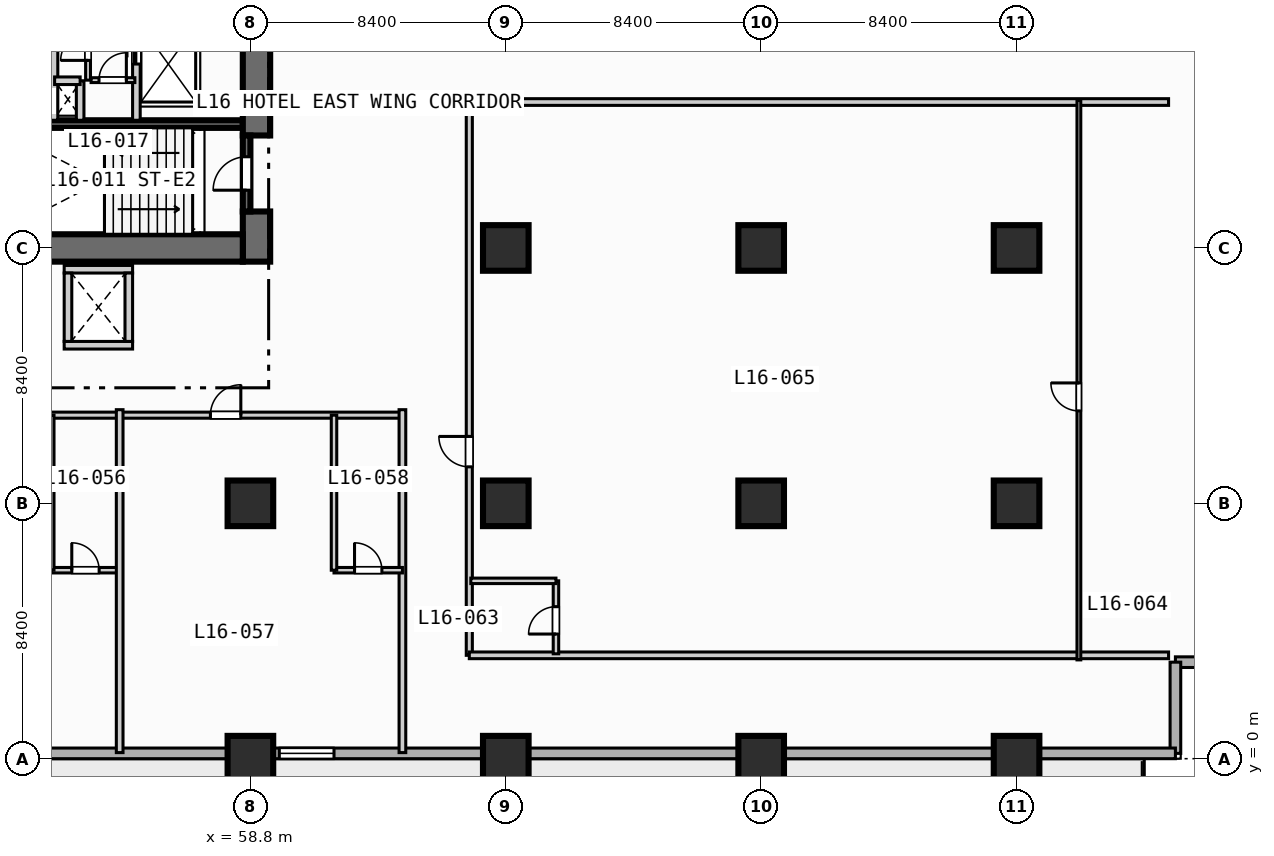
"""IFC4 building model, lengths in metres.
Left out: names, types, materials, properties, quantities, classifications, styles, units other than length and angle.
Written with IfcOpenShell. Run it as: python <this file> out.ifc"""

import sys

from ifc_helpers import new_model, si_unit, direction, frame, frame_2d, origin, origin_2d, place, context, subcontext, project, spatial, rectangle, extrude, element, fill, save


model = new_model("IFC4")
c1 = context("Model", 3, precision=1e-05, world=origin(), true_north=direction((0.0, 1.0)))
c2 = subcontext(c1, "Body", "Model", "MODEL_VIEW")
j1 = project(units=[si_unit("LENGTHUNIT", "METRE"), si_unit("PLANEANGLEUNIT", "RADIAN")], contexts=[c1])
p1 = place(None, origin())
s1 = spatial("IfcSite", under=j1, at=p1, CompositionType="ELEMENT")
p2 = place(p1, origin())
s2 = spatial("IfcBuilding", under=s1, at=p2, CompositionType="ELEMENT")
p3 = place(p2, frame((0.0, 0.0, 70.0)))
s3 = spatial("IfcBuildingStorey", under=s2, at=p3, CompositionType="ELEMENT", Elevation=70.0)
p4 = place(p3, frame((50.5, 20.875, 0.0), z_axis=(0.0, 0.0, 1.0), x_axis=(1.0, 0.0, 0.0)))
e1 = element("IfcWall", 1, at=p4, inside=s3, PredefinedType="SOLIDWALL", context=c2, shape_type="SweptSolid", body=[
    extrude(rectangle(XDim=8.05, YDim=0.25, at=frame_2d((4.025, 0.0))), origin(), (0.0, 0.0, 1.0), 3.55),
])
p5 = place(p3, frame((59.0, 16.35, 0.0), z_axis=(0.0, 0.0, 1.0), x_axis=(0.0, 1.0, 0.0)))
e2 = element("IfcWall", 2, at=p5, inside=s3, PredefinedType="SHEAR", context=c2, shape_type="SweptSolid", body=[
    extrude(rectangle(XDim=1.65, YDim=0.9, at=frame_2d((0.825, 0.0))), origin(), (0.0, 0.0, 1.0), 3.55),
])
p6 = place(p3, frame((59.0, 20.5, 0.0), z_axis=(0.0, 0.0, 1.0), x_axis=(0.0, 1.0, 0.0)))
e3 = element("IfcWall", 3, at=p6, inside=s3, PredefinedType="SHEAR", context=c2, shape_type="SweptSolid", body=[
    extrude(rectangle(XDim=5.15, YDim=0.9, at=frame_2d((2.575, 0.0))), origin(), (0.0, 0.0, 1.0), 3.55),
])
p7 = place(p3, frame((42.2, 16.8, 0.0), z_axis=(0.0, 0.0, 1.0), x_axis=(1.0, 0.0, 0.0)))
e4 = element("IfcWall", 4, at=p7, inside=s3, PredefinedType="SHEAR", context=c2, shape_type="SweptSolid", body=[
    extrude(rectangle(XDim=16.35, YDim=0.9, at=frame_2d((8.175, 0.0))), origin(), (0.0, 0.0, 1.0), 3.55),
])
for number, where, z_axis, x_axis in (
    (5, (58.8, 0.0, 0.0), (0.0, 0.0, 1.0), (1.0, 0.0, 0.0)),
    (6, (58.8, 8.4, 0.0), (0.0, 0.0, 1.0), (1.0, 0.0, 0.0)),
    (7, (67.2, 0.0, 0.0), (0.0, 0.0, 1.0), (1.0, 0.0, 0.0)),
    (8, (67.2, 8.4, 0.0), (0.0, 0.0, 1.0), (1.0, 0.0, 0.0)),
    (9, (67.2, 16.8, 0.0), (0.0, 0.0, 1.0), (1.0, 0.0, 0.0)),
    (10, (75.6, 0.0, 0.0), (0.0, 0.0, 1.0), (1.0, 0.0, 0.0)),
    (11, (75.6, 8.4, 0.0), (0.0, 0.0, 1.0), (1.0, 0.0, 0.0)),
    (12, (75.6, 16.8, 0.0), (0.0, 0.0, 1.0), (1.0, 0.0, 0.0)),
    (13, (84.0, 0.0, 0.0), (0.0, 0.0, 1.0), (1.0, 0.0, 0.0)),
    (14, (84.0, 8.4, 0.0), (0.0, 0.0, 1.0), (1.0, 0.0, 0.0)),
    (15, (84.0, 16.8, 0.0), (0.0, 0.0, 1.0), (1.0, 0.0, 0.0)),
):
    element("IfcColumn", number, at=place(p3, frame(where, z_axis=z_axis, x_axis=x_axis)), inside=s3, PredefinedType="COLUMN", context=c2, shape_type="SweptSolid", body=[
        extrude(rectangle(XDim=1.5, YDim=1.5, at=origin_2d()), origin(), (0.0, 0.0, 1.0), 3.8),
    ])
for number, where, z_axis, x_axis in (
    (16, (92.225, 3.175, 0.0), (0.0, 0.0, 1.0), (-1.0, 0.0, 0.0)),
    (17, (89.225, 3.175, 0.0), (0.0, 0.0, 1.0), (0.0, -1.0, 0.0)),
):
    element("IfcWall", number, at=place(p3, frame(where, z_axis=z_axis, x_axis=x_axis)), inside=s3, PredefinedType="STANDARD", context=c2, shape_type="SweptSolid", body=[
        extrude(rectangle(XDim=3.0, YDim=0.35, at=frame_2d((1.5, 0.0))), origin(), (0.0, 0.0, 1.0), 3.55),
    ])
p8 = place(p3, frame((89.225, 0.175, 0.0), z_axis=(0.0, 0.0, 1.0), x_axis=(-1.0, 0.0, 0.0)))
e18 = element("IfcWall", 18, at=p8, inside=s3, PredefinedType="STANDARD", context=c2, shape_type="SweptSolid", body=[
    extrude(rectangle(XDim=86.05, YDim=0.35, at=frame_2d((43.025, 0.0))), origin(), (0.0, 0.0, 1.0), 3.55),
])
p9 = place(p8, frame((67.525, 0.0, 0.0)))
e19 = element("IfcOpeningElement", 19, at=p9, cuts=e18, PredefinedType="OPENING", context=c2, shape_type="SweptSolid", body=[
    extrude(rectangle(XDim=1.4, YDim=2.2, at=frame_2d((0.7, 1.1))), frame((0.0, 0.185, 0.0), z_axis=(0.0, -1.0, 0.0), x_axis=(1.0, 0.0, 0.0)), (0.0, 0.0, 1.0), 0.37),
])
p10 = place(p8, frame((58.725, 0.0, 0.85)))
e20 = element("IfcOpeningElement", 20, at=p10, cuts=e18, PredefinedType="OPENING", context=c2, shape_type="SweptSolid", body=[
    extrude(rectangle(XDim=2.2, YDim=1.8, at=frame_2d((1.1, 0.9))), frame((0.0, 0.185, 0.0), z_axis=(0.0, -1.0, 0.0), x_axis=(1.0, 0.0, 0.0)), (0.0, 0.0, 1.0), 0.37),
])
p11 = place(p8, frame((50.325, 0.0, 0.85)))
e21 = element("IfcOpeningElement", 21, at=p11, cuts=e18, PredefinedType="OPENING", context=c2, shape_type="SweptSolid", body=[
    extrude(rectangle(XDim=2.2, YDim=1.8, at=frame_2d((1.1, 0.9))), frame((0.0, 0.185, 0.0), z_axis=(0.0, -1.0, 0.0), x_axis=(1.0, 0.0, 0.0)), (0.0, 0.0, 1.0), 0.37),
])
p12 = place(p8, frame((41.925, 0.0, 0.85)))
e22 = element("IfcOpeningElement", 22, at=p12, cuts=e18, PredefinedType="OPENING", context=c2, shape_type="SweptSolid", body=[
    extrude(rectangle(XDim=2.2, YDim=1.8, at=frame_2d((1.1, 0.9))), frame((0.0, 0.185, 0.0), z_axis=(0.0, -1.0, 0.0), x_axis=(1.0, 0.0, 0.0)), (0.0, 0.0, 1.0), 0.37),
])
p13 = place(p8, frame((27.675, 0.0, 0.85)))
e23 = element("IfcOpeningElement", 23, at=p13, cuts=e18, PredefinedType="OPENING", context=c2, shape_type="SweptSolid", body=[
    extrude(rectangle(XDim=1.8, YDim=1.8, at=frame_2d((0.9, 0.9))), frame((0.0, 0.185, 0.0), z_axis=(0.0, -1.0, 0.0), x_axis=(1.0, 0.0, 0.0)), (0.0, 0.0, 1.0), 0.37),
])
p14 = place(p3, frame((58.675, 18.0, 0.0), z_axis=(0.0, 0.0, 1.0), x_axis=(0.0, 1.0, 0.0)))
e24 = element("IfcWall", 24, at=p14, inside=s3, PredefinedType="SOLIDWALL", context=c2, shape_type="SweptSolid", body=[
    extrude(rectangle(XDim=2.5, YDim=0.25, at=frame_2d((1.25, 0.0))), origin(), (0.0, 0.0, 1.0), 3.55),
])
p15 = place(p14, frame((0.7, 0.0, 0.0)))
e25 = element("IfcOpeningElement", 25, at=p15, cuts=e24, PredefinedType="OPENING", context=c2, shape_type="SweptSolid", body=[
    extrude(rectangle(XDim=1.1, YDim=2.15, at=frame_2d((0.55, 1.075))), frame((0.0, 0.135, 0.0), z_axis=(0.0, -1.0, 0.0), x_axis=(1.0, 0.0, 0.0)), (0.0, 0.0, 1.0), 0.27),
])
p16 = place(p3, frame((52.34, 21.0, 0.0), z_axis=(0.0, 0.0, 1.0), x_axis=(0.0, 1.0, 0.0)))
e26 = element("IfcWall", 26, at=p16, inside=s3, PredefinedType="SOLIDWALL", context=c2, shape_type="SweptSolid", body=[
    extrude(rectangle(XDim=3.75, YDim=0.25, at=frame_2d((1.875, 0.0))), origin(), (0.0, 0.0, 1.0), 3.55),
])
p17 = place(p3, frame((55.05, 21.0, 0.0), z_axis=(0.0, 0.0, 1.0), x_axis=(0.0, 1.0, 0.0)))
e27 = element("IfcWall", 27, at=p17, inside=s3, PredefinedType="SOLIDWALL", context=c2, shape_type="SweptSolid", body=[
    extrude(rectangle(XDim=4.15, YDim=0.25, at=frame_2d((2.075, 0.0))), origin(), (0.0, 0.0, 1.0), 3.55),
])
p18 = place(p17, frame((1.85, 0.0, 0.0)))
e28 = element("IfcOpeningElement", 28, at=p18, cuts=e27, PredefinedType="OPENING", context=c2, shape_type="SweptSolid", body=[
    extrude(rectangle(XDim=1.1, YDim=2.15, at=frame_2d((0.55, 1.075))), frame((0.0, 0.135, 0.0), z_axis=(0.0, -1.0, 0.0), x_axis=(1.0, 0.0, 0.0)), (0.0, 0.0, 1.0), 0.27),
])
p19 = place(p3, frame((53.2, 21.0, 0.0), z_axis=(0.0, 0.0, 1.0), x_axis=(0.0, 1.0, 0.0)))
e29 = element("IfcWall", 29, at=p19, inside=s3, PredefinedType="SOLIDWALL", context=c2, shape_type="SweptSolid", body=[
    extrude(rectangle(XDim=1.3, YDim=0.25, at=frame_2d((0.65, 0.0))), origin(), (0.0, 0.0, 1.0), 3.55),
])
p20 = place(p3, frame((52.36, 22.3, 0.0), z_axis=(0.0, 0.0, 1.0), x_axis=(1.0, 0.0, 0.0)))
e30 = element("IfcWall", 30, at=p20, inside=s3, PredefinedType="SOLIDWALL", context=c2, shape_type="SweptSolid", body=[
    extrude(rectangle(XDim=0.84, YDim=0.25, at=frame_2d((0.42, 0.0))), origin(), (0.0, 0.0, 1.0), 3.55),
])
p21 = place(p3, frame((53.56, 22.32, 0.0), z_axis=(0.0, 0.0, 1.0), x_axis=(1.0, 0.0, 0.0)))
e31 = element("IfcWall", 31, at=p21, inside=s3, PredefinedType="PARTITIONING", context=c2, shape_type="SweptSolid", body=[
    extrude(rectangle(XDim=1.44, YDim=0.16, at=frame_2d((0.72, 0.0))), origin(), (0.0, 0.0, 1.0), 3.55),
])
p22 = place(p21, frame((0.26, 0.0, 0.0)))
e32 = element("IfcOpeningElement", 32, at=p22, cuts=e31, PredefinedType="OPENING", context=c2, shape_type="SweptSolid", body=[
    extrude(rectangle(XDim=0.9, YDim=2.1, at=frame_2d((0.45, 1.05))), frame((0.0, 0.09, 0.0), z_axis=(0.0, -1.0, 0.0), x_axis=(1.0, 0.0, 0.0)), (0.0, 0.0, 1.0), 0.18),
])
p23 = place(p3, frame((53.46, 22.32, 0.0), z_axis=(0.0, 0.0, 1.0), x_axis=(0.0, 1.0, 0.0)))
e33 = element("IfcWall", 33, at=p23, inside=s3, PredefinedType="PARTITIONING", context=c2, shape_type="SweptSolid", body=[
    extrude(rectangle(XDim=2.4, YDim=0.16, at=frame_2d((1.2, 0.0))), origin(), (0.0, 0.0, 1.0), 3.55),
])
p24 = place(p23, frame((0.65, 0.0, 0.0)))
e34 = element("IfcOpeningElement", 34, at=p24, cuts=e33, PredefinedType="OPENING", context=c2, shape_type="SweptSolid", body=[
    extrude(rectangle(XDim=0.9, YDim=2.1, at=frame_2d((0.45, 1.05))), frame((0.0, 0.09, 0.0), z_axis=(0.0, -1.0, 0.0), x_axis=(1.0, 0.0, 0.0)), (0.0, 0.0, 1.0), 0.18),
])
for number, where, z_axis, x_axis in (
    (35, (52.675, 13.6, 0.0), (0.0, 0.0, 1.0), (1.0, 0.0, 0.0)),
    (36, (52.675, 16.1, 0.0), (0.0, 0.0, 1.0), (1.0, 0.0, 0.0)),
    (37, (52.8, 13.725, 0.0), (0.0, 0.0, 1.0), (0.0, 1.0, 0.0)),
    (38, (54.8, 13.725, 0.0), (0.0, 0.0, 1.0), (0.0, 1.0, 0.0)),
):
    element("IfcWall", number, at=place(p3, frame(where, z_axis=z_axis, x_axis=x_axis)), inside=s3, PredefinedType="SOLIDWALL", context=c2, shape_type="SweptSolid", body=[
        extrude(rectangle(XDim=2.25, YDim=0.25, at=frame_2d((1.125, 0.0))), origin(), (0.0, 0.0, 1.0), 3.55),
    ])
p25 = place(p3, frame((13.7, 11.3, 0.0), z_axis=(0.0, 0.0, 1.0), x_axis=(1.0, 0.0, 0.0)))
e39 = element("IfcWall", 39, at=p25, inside=s3, PredefinedType="PARTITIONING", context=c2, shape_type="SweptSolid", body=[
    extrude(rectangle(XDim=50.1, YDim=0.2, at=frame_2d((25.05, 0.0))), origin(), (0.0, 0.0, 1.0), 3.55),
])
p26 = place(p25, frame((3.61, 0.0, 0.0)))
e40 = element("IfcOpeningElement", 40, at=p26, cuts=e39, PredefinedType="OPENING", context=c2, shape_type="SweptSolid", body=[
    extrude(rectangle(XDim=1.0, YDim=2.15, at=frame_2d((0.5, 1.075))), frame((0.0, 0.11, 0.0), z_axis=(0.0, -1.0, 0.0), x_axis=(1.0, 0.0, 0.0)), (0.0, 0.0, 1.0), 0.22),
])
p27 = place(p25, frame((16.81, 0.0, 0.0)))
e41 = element("IfcOpeningElement", 41, at=p27, cuts=e39, PredefinedType="OPENING", context=c2, shape_type="SweptSolid", body=[
    extrude(rectangle(XDim=1.0, YDim=2.15, at=frame_2d((0.5, 1.075))), frame((0.0, 0.11, 0.0), z_axis=(0.0, -1.0, 0.0), x_axis=(1.0, 0.0, 0.0)), (0.0, 0.0, 1.0), 0.22),
])
p28 = place(p25, frame((31.935, 0.0, 0.0)))
e42 = element("IfcOpeningElement", 42, at=p28, cuts=e39, PredefinedType="OPENING", context=c2, shape_type="SweptSolid", body=[
    extrude(rectangle(XDim=1.0, YDim=2.15, at=frame_2d((0.5, 1.075))), frame((0.0, 0.11, 0.0), z_axis=(0.0, -1.0, 0.0), x_axis=(1.0, 0.0, 0.0)), (0.0, 0.0, 1.0), 0.22),
])
p29 = place(p25, frame((43.785, 0.0, 0.0)))
e43 = element("IfcOpeningElement", 43, at=p29, cuts=e39, PredefinedType="OPENING", context=c2, shape_type="SweptSolid", body=[
    extrude(rectangle(XDim=1.0, YDim=2.15, at=frame_2d((0.5, 1.075))), frame((0.0, 0.11, 0.0), z_axis=(0.0, -1.0, 0.0), x_axis=(1.0, 0.0, 0.0)), (0.0, 0.0, 1.0), 0.22),
])
p30 = place(p3, frame((52.25, 6.2, 0.0), z_axis=(0.0, 0.0, 1.0), x_axis=(1.0, 0.0, 0.0)))
e44 = element("IfcWall", 44, at=p30, inside=s3, PredefinedType="PLUMBINGWALL", context=c2, shape_type="SweptSolid", body=[
    extrude(rectangle(XDim=2.25, YDim=0.18, at=frame_2d((1.125, 0.0))), origin(), (0.0, 0.0, 1.0), 3.55),
])
p31 = place(p30, frame((0.675, 0.0, 0.0)))
e45 = element("IfcOpeningElement", 45, at=p31, cuts=e44, PredefinedType="OPENING", context=c2, shape_type="SweptSolid", body=[
    extrude(rectangle(XDim=0.9, YDim=2.1, at=frame_2d((0.45, 1.05))), frame((0.0, 0.1, 0.0), z_axis=(0.0, -1.0, 0.0), x_axis=(1.0, 0.0, 0.0)), (0.0, 0.0, 1.0), 0.2),
])
p32 = place(p3, frame((52.25, 6.2, 0.0), z_axis=(0.0, 0.0, 1.0), x_axis=(0.0, 1.0, 0.0)))
e46 = element("IfcWall", 46, at=p32, inside=s3, PredefinedType="PLUMBINGWALL", context=c2, shape_type="SweptSolid", body=[
    extrude(rectangle(XDim=5.1, YDim=0.18, at=frame_2d((2.55, 0.0))), origin(), (0.0, 0.0, 1.0), 3.55),
])
for number, where, z_axis, x_axis in (
    (47, (54.5, 0.2, 0.0), (0.0, 0.0, 1.0), (0.0, 1.0, 0.0)),
    (48, (63.8, 0.2, 0.0), (0.0, 0.0, 1.0), (0.0, 1.0, 0.0)),
):
    element("IfcWall", number, at=place(p3, frame(where, z_axis=z_axis, x_axis=x_axis)), inside=s3, PredefinedType="PARTITIONING", context=c2, shape_type="SweptSolid", body=[
        extrude(rectangle(XDim=11.28, YDim=0.22, at=frame_2d((5.64, 0.0))), origin(), (0.0, 0.0, 1.0), 3.55),
    ])
p33 = place(p3, frame((61.55, 6.2, 0.0), z_axis=(0.0, 0.0, 1.0), x_axis=(1.0, 0.0, 0.0)))
e49 = element("IfcWall", 49, at=p33, inside=s3, PredefinedType="PLUMBINGWALL", context=c2, shape_type="SweptSolid", body=[
    extrude(rectangle(XDim=2.25, YDim=0.18, at=frame_2d((1.125, 0.0))), origin(), (0.0, 0.0, 1.0), 3.55),
])
p34 = place(p33, frame((0.675, 0.0, 0.0)))
e50 = element("IfcOpeningElement", 50, at=p34, cuts=e49, PredefinedType="OPENING", context=c2, shape_type="SweptSolid", body=[
    extrude(rectangle(XDim=0.9, YDim=2.1, at=frame_2d((0.45, 1.05))), frame((0.0, 0.1, 0.0), z_axis=(0.0, -1.0, 0.0), x_axis=(1.0, 0.0, 0.0)), (0.0, 0.0, 1.0), 0.2),
])
p35 = place(p3, frame((61.55, 6.2, 0.0), z_axis=(0.0, 0.0, 1.0), x_axis=(0.0, 1.0, 0.0)))
e51 = element("IfcWall", 51, at=p35, inside=s3, PredefinedType="PLUMBINGWALL", context=c2, shape_type="SweptSolid", body=[
    extrude(rectangle(XDim=5.1, YDim=0.18, at=frame_2d((2.55, 0.0))), origin(), (0.0, 0.0, 1.0), 3.55),
])
p36 = place(p3, frame((66.0, 3.4, 0.0), z_axis=(0.0, 0.0, 1.0), x_axis=(0.0, 1.0, 0.0)))
e52 = element("IfcWall", 52, at=p36, inside=s3, PredefinedType="PARTITIONING", context=c2, shape_type="SweptSolid", body=[
    extrude(rectangle(XDim=18.2, YDim=0.2, at=frame_2d((9.1, 0.0))), origin(), (0.0, 0.0, 1.0), 3.55),
])
p37 = place(p36, frame((6.2, 0.0, 0.0)))
e53 = element("IfcOpeningElement", 53, at=p37, cuts=e52, PredefinedType="OPENING", context=c2, shape_type="SweptSolid", body=[
    extrude(rectangle(XDim=1.0, YDim=2.15, at=frame_2d((0.5, 1.075))), frame((0.0, 0.11, 0.0), z_axis=(0.0, -1.0, 0.0), x_axis=(1.0, 0.0, 0.0)), (0.0, 0.0, 1.0), 0.22),
])
for number, where, z_axis, x_axis in (
    (54, (66.0, 3.4, 0.0), (0.0, 0.0, 1.0), (1.0, 0.0, 0.0)),
    (55, (66.0, 21.6, 0.0), (0.0, 0.0, 1.0), (1.0, 0.0, 0.0)),
):
    element("IfcWall", number, at=place(p3, frame(where, z_axis=z_axis, x_axis=x_axis)), inside=s3, PredefinedType="PARTITIONING", context=c2, shape_type="SweptSolid", body=[
        extrude(rectangle(XDim=23.0, YDim=0.22, at=frame_2d((11.5, 0.0))), origin(), (0.0, 0.0, 1.0), 3.55),
    ])
p38 = place(p3, frame((68.85, 3.45, 0.0), z_axis=(0.0, 0.0, 1.0), x_axis=(0.0, 1.0, 0.0)))
e56 = element("IfcWall", 56, at=p38, inside=s3, PredefinedType="PLUMBINGWALL", context=c2, shape_type="SweptSolid", body=[
    extrude(rectangle(XDim=2.4, YDim=0.18, at=frame_2d((1.2, 0.0))), origin(), (0.0, 0.0, 1.0), 3.55),
])
p39 = place(p38, frame((0.65, 0.0, 0.0)))
e57 = element("IfcOpeningElement", 57, at=p39, cuts=e56, PredefinedType="OPENING", context=c2, shape_type="SweptSolid", body=[
    extrude(rectangle(XDim=0.9, YDim=2.1, at=frame_2d((0.45, 1.05))), frame((0.0, 0.1, 0.0), z_axis=(0.0, -1.0, 0.0), x_axis=(1.0, 0.0, 0.0)), (0.0, 0.0, 1.0), 0.2),
])
p40 = place(p3, frame((66.05, 5.85, 0.0), z_axis=(0.0, 0.0, 1.0), x_axis=(1.0, 0.0, 0.0)))
e58 = element("IfcWall", 58, at=p40, inside=s3, PredefinedType="PLUMBINGWALL", context=c2, shape_type="SweptSolid", body=[
    extrude(rectangle(XDim=2.8, YDim=0.18, at=frame_2d((1.4, 0.0))), origin(), (0.0, 0.0, 1.0), 3.55),
])
p41 = place(p3, frame((86.05, 3.25, 0.0), z_axis=(0.0, 0.0, 1.0), x_axis=(0.0, 1.0, 0.0)))
e59 = element("IfcWall", 59, at=p41, inside=s3, PredefinedType="PARTITIONING", context=c2, shape_type="SweptSolid", body=[
    extrude(rectangle(XDim=18.4, YDim=0.125, at=frame_2d((9.2, 0.0))), origin(), (0.0, 0.0, 1.0), 3.55),
])
p42 = place(p41, frame((8.19, 0.0, 0.0)))
e60 = element("IfcOpeningElement", 60, at=p42, cuts=e59, PredefinedType="OPENING", context=c2, shape_type="SweptSolid", body=[
    extrude(rectangle(XDim=0.92, YDim=2.1, at=frame_2d((0.46, 1.05))), frame((0.0, 0.073, 0.0), z_axis=(0.0, -1.0, 0.0), x_axis=(1.0, 0.0, 0.0)), (0.0, 0.0, 1.0), 0.145),
])
p43 = place(p13, origin())
e61 = element("IfcWindow", 61, at=p43, inside=s3, PartitioningType="SINGLE_PANEL", PredefinedType="WINDOW", context=c2, shape_type="SweptSolid", body=[
    extrude(rectangle(XDim=1.8, YDim=1.8, at=frame_2d((0.9, 0.9))), frame((0.0, 0.03, 0.0), z_axis=(0.0, -1.0, 0.0), x_axis=(1.0, 0.0, 0.0)), (0.0, 0.0, 1.0), 0.06),
])
fill(e23, e61)
p44 = place(p15, origin())
e62 = element("IfcDoor", 62, at=p44, inside=s3, OperationType="SINGLE_SWING_LEFT", PredefinedType="DOOR", context=c2, shape_type="SweptSolid", body=[
    extrude(rectangle(XDim=1.1, YDim=2.15, at=frame_2d((0.55, 1.075))), frame((0.0, 0.025, 0.0), z_axis=(0.0, -1.0, 0.0), x_axis=(1.0, 0.0, 0.0)), (0.0, 0.0, 1.0), 0.05),
])
fill(e25, e62)
p45 = place(p18, origin())
e63 = element("IfcDoor", 63, at=p45, inside=s3, OperationType="SLIDING_TO_LEFT", PredefinedType="DOOR", context=c2, shape_type="SweptSolid", body=[
    extrude(rectangle(XDim=1.1, YDim=2.15, at=frame_2d((0.55, 1.075))), frame((0.0, 0.025, 0.0), z_axis=(0.0, -1.0, 0.0), x_axis=(1.0, 0.0, 0.0)), (0.0, 0.0, 1.0), 0.05),
])
fill(e28, e63)
p46 = place(p22, origin())
e64 = element("IfcDoor", 64, at=p46, inside=s3, OperationType="SINGLE_SWING_RIGHT", PredefinedType="DOOR", context=c2, shape_type="SweptSolid", body=[
    extrude(rectangle(XDim=0.9, YDim=2.1, at=frame_2d((0.45, 1.05))), frame((0.0, 0.025, 0.0), z_axis=(0.0, -1.0, 0.0), x_axis=(1.0, 0.0, 0.0)), (0.0, 0.0, 1.0), 0.05),
])
fill(e32, e64)
p47 = place(p24, origin())
e65 = element("IfcDoor", 65, at=p47, inside=s3, OperationType="SINGLE_SWING_LEFT", PredefinedType="DOOR", context=c2, shape_type="SweptSolid", body=[
    extrude(rectangle(XDim=0.9, YDim=2.1, at=frame_2d((0.45, 1.05))), frame((0.0, 0.025, 0.0), z_axis=(0.0, -1.0, 0.0), x_axis=(1.0, 0.0, 0.0)), (0.0, 0.0, 1.0), 0.05),
])
fill(e34, e65)
p48 = place(p29, origin())
e66 = element("IfcDoor", 66, at=p48, inside=s3, OperationType="SINGLE_SWING_RIGHT", PredefinedType="DOOR", context=c2, shape_type="SweptSolid", body=[
    extrude(rectangle(XDim=1.0, YDim=2.15, at=frame_2d((0.5, 1.075))), frame((0.0, 0.025, 0.0), z_axis=(0.0, -1.0, 0.0), x_axis=(1.0, 0.0, 0.0)), (0.0, 0.0, 1.0), 0.05),
])
fill(e43, e66)
p49 = place(p31, origin())
e67 = element("IfcDoor", 67, at=p49, inside=s3, OperationType="SINGLE_SWING_LEFT", PredefinedType="DOOR", context=c2, shape_type="SweptSolid", body=[
    extrude(rectangle(XDim=0.9, YDim=2.1, at=frame_2d((0.45, 1.05))), frame((0.0, 0.025, 0.0), z_axis=(0.0, -1.0, 0.0), x_axis=(1.0, 0.0, 0.0)), (0.0, 0.0, 1.0), 0.05),
])
fill(e45, e67)
p50 = place(p34, origin())
e68 = element("IfcDoor", 68, at=p50, inside=s3, OperationType="SINGLE_SWING_LEFT", PredefinedType="DOOR", context=c2, shape_type="SweptSolid", body=[
    extrude(rectangle(XDim=0.9, YDim=2.1, at=frame_2d((0.45, 1.05))), frame((0.0, 0.025, 0.0), z_axis=(0.0, -1.0, 0.0), x_axis=(1.0, 0.0, 0.0)), (0.0, 0.0, 1.0), 0.05),
])
fill(e50, e68)
p51 = place(p37, origin())
e69 = element("IfcDoor", 69, at=p51, inside=s3, OperationType="SINGLE_SWING_RIGHT", PredefinedType="DOOR", context=c2, shape_type="SweptSolid", body=[
    extrude(rectangle(XDim=1.0, YDim=2.15, at=frame_2d((0.5, 1.075))), frame((0.0, 0.025, 0.0), z_axis=(0.0, -1.0, 0.0), x_axis=(1.0, 0.0, 0.0)), (0.0, 0.0, 1.0), 0.05),
])
fill(e53, e69)
p52 = place(p39, origin())
e70 = element("IfcDoor", 70, at=p52, inside=s3, OperationType="SINGLE_SWING_LEFT", PredefinedType="DOOR", context=c2, shape_type="SweptSolid", body=[
    extrude(rectangle(XDim=0.9, YDim=2.1, at=frame_2d((0.45, 1.05))), frame((0.0, 0.025, 0.0), z_axis=(0.0, -1.0, 0.0), x_axis=(1.0, 0.0, 0.0)), (0.0, 0.0, 1.0), 0.05),
])
fill(e57, e70)
p53 = place(p42, origin())
e71 = element("IfcDoor", 71, at=p53, inside=s3, OperationType="SINGLE_SWING_RIGHT", PredefinedType="DOOR", context=c2, shape_type="SweptSolid", body=[
    extrude(rectangle(XDim=0.92, YDim=2.1, at=frame_2d((0.46, 1.05))), frame((0.0, 0.025, 0.0), z_axis=(0.0, -1.0, 0.0), x_axis=(1.0, 0.0, 0.0)), (0.0, 0.0, 1.0), 0.05),
])
fill(e60, e71)
save(model, sys.argv[1])
